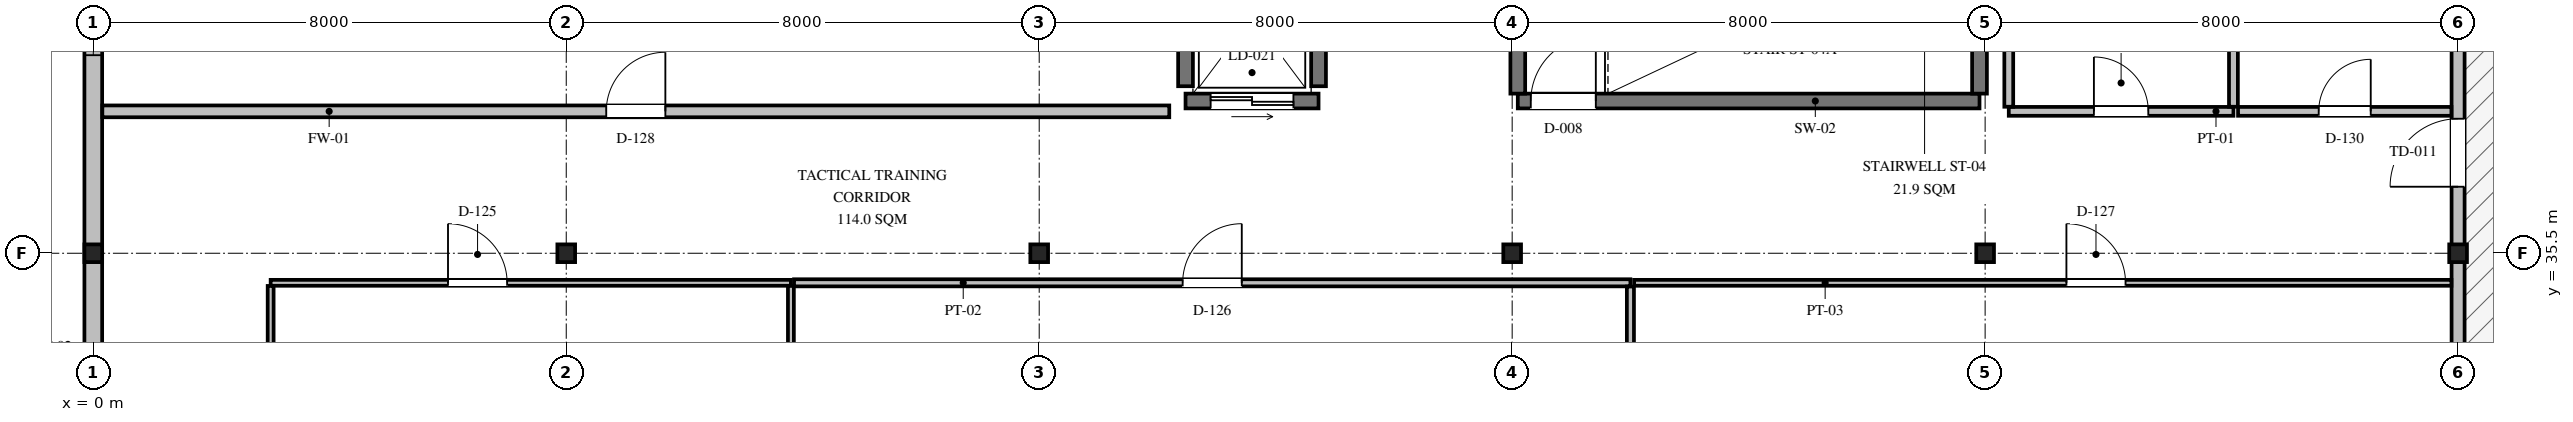
"""IFC4 building model, lengths in metres.
Left out: names, types, materials, properties, quantities, classifications, styles, units other than length and angle.
Written with IfcOpenShell. Run it as: python <this file> out.ifc"""

import sys

from ifc_helpers import new_model, si_unit, direction, frame, frame_2d, origin, origin_2d, place, context, subcontext, project, spatial, rectangle, i_section, extrude, element, fill, save


model = new_model("IFC4")
c1 = context("Model", 3, precision=1e-05, world=origin(), true_north=direction((0.0, 1.0)))
c2 = subcontext(c1, "Body", "Model", "MODEL_VIEW")
j1 = project(units=[si_unit("LENGTHUNIT", "METRE"), si_unit("PLANEANGLEUNIT", "RADIAN")], contexts=[c1])
p1 = place(None, origin())
s1 = spatial("IfcSite", under=j1, at=p1, CompositionType="ELEMENT")
p2 = place(p1, origin())
s2 = spatial("IfcBuilding", under=s1, at=p2, CompositionType="ELEMENT")
p3 = place(p2, frame((0.0, 0.0, 5.85)))
s3 = spatial("IfcBuildingStorey", under=s2, at=p3, CompositionType="ELEMENT", Elevation=5.85)
for number, where, z_axis, x_axis in (
    (1, (0.0, 35.5, 0.0), (0.0, 0.0, 1.0), (1.0, 0.0, 0.0)),
    (2, (8.0, 35.5, 0.0), (0.0, 0.0, 1.0), (1.0, 0.0, 0.0)),
    (3, (16.0, 35.5, 0.0), (0.0, 0.0, 1.0), (1.0, 0.0, 0.0)),
    (4, (24.0, 35.5, 0.0), (0.0, 0.0, 1.0), (1.0, 0.0, 0.0)),
    (5, (32.0, 35.5, 0.0), (0.0, 0.0, 1.0), (1.0, 0.0, 0.0)),
    (6, (40.0, 35.5, 0.0), (0.0, 0.0, 1.0), (1.0, 0.0, 0.0)),
):
    element("IfcColumn", number, at=place(p3, frame(where, z_axis=z_axis, x_axis=x_axis)), inside=s3, PredefinedType="COLUMN", context=c2, shape_type="SweptSolid", body=[
        extrude(i_section(OverallWidth=0.3, OverallDepth=0.3, WebThickness=0.01, FlangeThickness=0.015, FilletRadius=0.018, at=origin_2d()), origin(), (0.0, 0.0, 1.0), 4.2),
    ])
p4 = place(p3, frame((0.0, 22.65, 0.0), z_axis=(0.0, 0.0, 1.0), x_axis=(0.0, 1.0, 0.0)))
e7 = element("IfcWall", 7, at=p4, inside=s3, PredefinedType="SOLIDWALL", context=c2, shape_type="SweptSolid", body=[
    extrude(rectangle(XDim=19.675, YDim=0.3, at=frame_2d((9.837, 0.0))), origin(), (0.0, 0.0, 1.0), 3.444),
])
p5 = place(p4, frame((8.5, 0.0, 1.1)))
e8 = element("IfcOpeningElement", 8, at=p5, cuts=e7, PredefinedType="OPENING", context=c2, shape_type="SweptSolid", body=[
    extrude(rectangle(XDim=2.2, YDim=1.5, at=frame_2d((1.1, 0.75))), frame((0.0, 0.16, 0.0), z_axis=(0.0, -1.0, 0.0), x_axis=(1.0, 0.0, 0.0)), (0.0, 0.0, 1.0), 0.32),
])
p6 = place(p4, frame((16.2, 0.0, 1.1)))
e9 = element("IfcOpeningElement", 9, at=p6, cuts=e7, PredefinedType="OPENING", context=c2, shape_type="SweptSolid", body=[
    extrude(rectangle(XDim=2.4, YDim=1.5, at=frame_2d((1.2, 0.75))), frame((0.0, 0.16, 0.0), z_axis=(0.0, -1.0, 0.0), x_axis=(1.0, 0.0, 0.0)), (0.0, 0.0, 1.0), 0.32),
])
p7 = place(p3, frame((40.0, 22.625, 0.0), z_axis=(0.0, 0.0, 1.0), x_axis=(0.0, 1.0, 0.0)))
e10 = element("IfcWall", 10, at=p7, inside=s3, PredefinedType="SOLIDWALL", context=c2, shape_type="SweptSolid", body=[
    extrude(rectangle(XDim=19.7, YDim=0.22, at=frame_2d((9.85, 0.0))), origin(), (0.0, 0.0, 1.0), 3.294),
])
p8 = place(p7, frame((14.0, 0.0, 0.0)))
e11 = element("IfcOpeningElement", 11, at=p8, cuts=e10, PredefinedType="OPENING", context=c2, shape_type="SweptSolid", body=[
    extrude(rectangle(XDim=1.15, YDim=2.2, at=frame_2d((0.575, 1.1))), frame((0.0, 0.12, 0.0), z_axis=(0.0, -1.0, 0.0), x_axis=(1.0, 0.0, 0.0)), (0.0, 0.0, 1.0), 0.24),
])
p9 = place(p7, frame((3.0, 0.0, 1.0)))
e12 = element("IfcOpeningElement", 12, at=p9, cuts=e10, PredefinedType="OPENING", context=c2, shape_type="SweptSolid", body=[
    extrude(rectangle(XDim=1.75, YDim=1.3, at=frame_2d((0.875, 0.65))), frame((0.0, 0.12, 0.0), z_axis=(0.0, -1.0, 0.0), x_axis=(1.0, 0.0, 0.0)), (0.0, 0.0, 1.0), 0.24),
])
p10 = place(p3, frame((24.095, 38.075, 0.0), z_axis=(0.0, 0.0, 1.0), x_axis=(1.0, 0.0, 0.0)))
e13 = element("IfcWall", 13, at=p10, inside=s3, PredefinedType="SHEAR", context=c2, shape_type="SweptSolid", body=[
    extrude(rectangle(XDim=7.81, YDim=0.25, at=frame_2d((3.905, 0.0))), origin(), (0.0, 0.0, 1.0), 4.0),
])
p11 = place(p10, frame((0.22, 0.0, 0.0)))
e14 = element("IfcOpeningElement", 14, at=p11, cuts=e13, PredefinedType="OPENING", context=c2, shape_type="SweptSolid", body=[
    extrude(rectangle(XDim=1.1, YDim=2.15, at=frame_2d((0.55, 1.075))), frame((0.0, 0.135, 0.0), z_axis=(0.0, -1.0, 0.0), x_axis=(1.0, 0.0, 0.0)), (0.0, 0.0, 1.0), 0.27),
])
for number, where, z_axis, x_axis in (
    (15, (24.095, 38.2, 0.0), (0.0, 0.0, 1.0), (0.0, 1.0, 0.0)),
    (16, (31.905, 38.2, 0.0), (0.0, 0.0, 1.0), (0.0, 1.0, 0.0)),
):
    element("IfcWall", number, at=place(p3, frame(where, z_axis=z_axis, x_axis=x_axis)), inside=s3, PredefinedType="SHEAR", context=c2, shape_type="SweptSolid", body=[
        extrude(rectangle(XDim=2.9, YDim=0.25, at=frame_2d((1.45, 0.0))), origin(), (0.0, 0.0, 1.0), 4.0),
    ])
p12 = place(p3, frame((18.475, 38.075, 0.0), z_axis=(0.0, 0.0, 1.0), x_axis=(1.0, 0.0, 0.0)))
e17 = element("IfcWall", 17, at=p12, inside=s3, PredefinedType="SHEAR", context=c2, shape_type="SweptSolid", body=[
    extrude(rectangle(XDim=2.25, YDim=0.25, at=frame_2d((1.125, 0.0))), origin(), (0.0, 0.0, 1.0), 4.0),
])
p13 = place(p12, frame((0.425, 0.0, 0.0)))
e18 = element("IfcOpeningElement", 18, at=p13, cuts=e17, PredefinedType="OPENING", context=c2, shape_type="SweptSolid", body=[
    extrude(rectangle(XDim=1.4, YDim=2.2, at=frame_2d((0.7, 1.1))), frame((0.0, 0.135, 0.0), z_axis=(0.0, -1.0, 0.0), x_axis=(1.0, 0.0, 0.0)), (0.0, 0.0, 1.0), 0.27),
])
for number, where, z_axis, x_axis in (
    (19, (18.475, 38.325, 0.0), (0.0, 0.0, 1.0), (0.0, 1.0, 0.0)),
    (20, (20.725, 38.325, 0.0), (0.0, 0.0, 1.0), (0.0, 1.0, 0.0)),
):
    element("IfcWall", number, at=place(p3, frame(where, z_axis=z_axis, x_axis=x_axis)), inside=s3, PredefinedType="SHEAR", context=c2, shape_type="SweptSolid", body=[
        extrude(rectangle(XDim=2.35, YDim=0.25, at=frame_2d((1.175, 0.0))), origin(), (0.0, 0.0, 1.0), 4.0),
    ])
p14 = place(p3, frame((3.0, 35.0, 0.0), z_axis=(0.0, 0.0, 1.0), x_axis=(1.0, 0.0, 0.0)))
e21 = element("IfcWall", 21, at=p14, inside=s3, PredefinedType="PARTITIONING", context=c2, shape_type="SweptSolid", body=[
    extrude(rectangle(XDim=8.8, YDim=0.1, at=frame_2d((4.4, 0.0))), origin(), (0.0, 0.0, 1.0), 4.0),
])
p15 = place(p14, frame((3.0, 0.0, 0.0)))
e22 = element("IfcOpeningElement", 22, at=p15, cuts=e21, PredefinedType="OPENING", context=c2, shape_type="SweptSolid", body=[
    extrude(rectangle(XDim=1.0, YDim=2.1, at=frame_2d((0.5, 1.05))), frame((0.0, 0.06, 0.0), z_axis=(0.0, -1.0, 0.0), x_axis=(1.0, 0.0, 0.0)), (0.0, 0.0, 1.0), 0.12),
])
p16 = place(p3, frame((3.0, 27.253, 0.0), z_axis=(0.0, 0.0, 1.0), x_axis=(0.0, 1.0, 0.0)))
e23 = element("IfcWall", 23, at=p16, inside=s3, PredefinedType="PARTITIONING", context=c2, shape_type="SweptSolid", body=[
    extrude(rectangle(XDim=7.694, YDim=0.1, at=frame_2d((3.847, 0.0))), origin(), (0.0, 0.0, 1.0), 4.0),
])
p17 = place(p3, frame((11.8, 27.253, 0.0), z_axis=(0.0, 0.0, 1.0), x_axis=(0.0, 1.0, 0.0)))
e24 = element("IfcWall", 24, at=p17, inside=s3, PredefinedType="PARTITIONING", context=c2, shape_type="SweptSolid", body=[
    extrude(rectangle(XDim=7.694, YDim=0.1, at=frame_2d((3.847, 0.0))), origin(), (0.0, 0.0, 1.0), 3.694),
])
p18 = place(p3, frame((11.853, 35.0, 0.0), z_axis=(0.0, 0.0, 1.0), x_axis=(1.0, 0.0, 0.0)))
e25 = element("IfcWall", 25, at=p18, inside=s3, PredefinedType="PARTITIONING", context=c2, shape_type="SweptSolid", body=[
    extrude(rectangle(XDim=14.147, YDim=0.12, at=frame_2d((7.073, 0.0))), origin(), (0.0, 0.0, 1.0), 4.0),
])
p19 = place(p18, frame((6.573, 0.0, 0.0)))
e26 = element("IfcOpeningElement", 26, at=p19, cuts=e25, PredefinedType="OPENING", context=c2, shape_type="SweptSolid", body=[
    extrude(rectangle(XDim=1.0, YDim=2.1, at=frame_2d((0.5, 1.05))), frame((0.0, 0.07, 0.0), z_axis=(0.0, -1.0, 0.0), x_axis=(1.0, 0.0, 0.0)), (0.0, 0.0, 1.0), 0.14),
])
p20 = place(p3, frame((26.0, 22.603, 0.0), z_axis=(0.0, 0.0, 1.0), x_axis=(0.0, 1.0, 0.0)))
e27 = element("IfcWall", 27, at=p20, inside=s3, PredefinedType="PARTITIONING", context=c2, shape_type="SweptSolid", body=[
    extrude(rectangle(XDim=12.334, YDim=0.12, at=frame_2d((6.167, 0.0))), origin(), (0.0, 0.0, 1.0), 4.0),
])
p21 = place(p3, frame((26.063, 35.0, 0.0), z_axis=(0.0, 0.0, 1.0), x_axis=(1.0, 0.0, 0.0)))
e28 = element("IfcWall", 28, at=p21, inside=s3, PredefinedType="PARTITIONING", context=c2, shape_type="SweptSolid", body=[
    extrude(rectangle(XDim=13.824, YDim=0.1, at=frame_2d((6.912, 0.0))), origin(), (0.0, 0.0, 1.0), 4.0),
])
p22 = place(p21, frame((7.312, 0.0, 0.0)))
e29 = element("IfcOpeningElement", 29, at=p22, cuts=e28, PredefinedType="OPENING", context=c2, shape_type="SweptSolid", body=[
    extrude(rectangle(XDim=1.0, YDim=2.1, at=frame_2d((0.5, 1.05))), frame((0.0, 0.06, 0.0), z_axis=(0.0, -1.0, 0.0), x_axis=(1.0, 0.0, 0.0)), (0.0, 0.0, 1.0), 0.12),
])
p23 = place(p3, frame((0.153, 37.9, 0.0), z_axis=(0.0, 0.0, 1.0), x_axis=(1.0, 0.0, 0.0)))
e30 = element("IfcWall", 30, at=p23, inside=s3, PredefinedType="PARTITIONING", context=c2, shape_type="SweptSolid", body=[
    extrude(rectangle(XDim=18.047, YDim=0.2, at=frame_2d((9.023, 0.0))), origin(), (0.0, 0.0, 1.0), 4.0),
])
p24 = place(p23, frame((8.523, 0.0, 0.0)))
e31 = element("IfcOpeningElement", 31, at=p24, cuts=e30, PredefinedType="OPENING", context=c2, shape_type="SweptSolid", body=[
    extrude(rectangle(XDim=1.0, YDim=2.1, at=frame_2d((0.5, 1.05))), frame((0.0, 0.11, 0.0), z_axis=(0.0, -1.0, 0.0), x_axis=(1.0, 0.0, 0.0)), (0.0, 0.0, 1.0), 0.22),
])
p25 = place(p3, frame((32.4, 37.9, 0.0), z_axis=(0.0, 0.0, 1.0), x_axis=(1.0, 0.0, 0.0)))
e32 = element("IfcWall", 32, at=p25, inside=s3, PredefinedType="PARTITIONING", context=c2, shape_type="SweptSolid", body=[
    extrude(rectangle(XDim=3.8, YDim=0.15, at=frame_2d((1.9, 0.0))), origin(), (0.0, 0.0, 1.0), 4.0),
])
p26 = place(p25, frame((1.44, 0.0, 0.0)))
e33 = element("IfcOpeningElement", 33, at=p26, cuts=e32, PredefinedType="OPENING", context=c2, shape_type="SweptSolid", body=[
    extrude(rectangle(XDim=0.92, YDim=2.1, at=frame_2d((0.46, 1.05))), frame((0.0, 0.085, 0.0), z_axis=(0.0, -1.0, 0.0), x_axis=(1.0, 0.0, 0.0)), (0.0, 0.0, 1.0), 0.17),
])
p27 = place(p3, frame((32.4, 37.978, 0.0), z_axis=(0.0, 0.0, 1.0), x_axis=(0.0, 1.0, 0.0)))
e34 = element("IfcWall", 34, at=p27, inside=s3, PredefinedType="PARTITIONING", context=c2, shape_type="SweptSolid", body=[
    extrude(rectangle(XDim=4.044, YDim=0.15, at=frame_2d((2.022, 0.0))), origin(), (0.0, 0.0, 1.0), 4.0),
])
p28 = place(p3, frame((36.2, 37.978, 0.0), z_axis=(0.0, 0.0, 1.0), x_axis=(0.0, 1.0, 0.0)))
e35 = element("IfcWall", 35, at=p28, inside=s3, PredefinedType="PARTITIONING", context=c2, shape_type="SweptSolid", body=[
    extrude(rectangle(XDim=4.044, YDim=0.15, at=frame_2d((2.022, 0.0))), origin(), (0.0, 0.0, 1.0), 3.7),
])
p29 = place(p3, frame((36.278, 37.9, 0.0), z_axis=(0.0, 0.0, 1.0), x_axis=(1.0, 0.0, 0.0)))
e36 = element("IfcWall", 36, at=p29, inside=s3, PredefinedType="PARTITIONING", context=c2, shape_type="SweptSolid", body=[
    extrude(rectangle(XDim=3.609, YDim=0.15, at=frame_2d((1.804, 0.0))), origin(), (0.0, 0.0, 1.0), 4.0),
])
p30 = place(p29, frame((1.365, 0.0, 0.0)))
e37 = element("IfcOpeningElement", 37, at=p30, cuts=e36, PredefinedType="OPENING", context=c2, shape_type="SweptSolid", body=[
    extrude(rectangle(XDim=0.88, YDim=2.1, at=frame_2d((0.44, 1.05))), frame((0.0, 0.085, 0.0), z_axis=(0.0, -1.0, 0.0), x_axis=(1.0, 0.0, 0.0)), (0.0, 0.0, 1.0), 0.17),
])
p31 = place(p6, origin())
e38 = element("IfcWindow", 38, at=p31, inside=s3, PartitioningType="SINGLE_PANEL", PredefinedType="WINDOW", context=c2, shape_type="SweptSolid", body=[
    extrude(rectangle(XDim=2.4, YDim=1.5, at=frame_2d((1.2, 0.75))), frame((0.0, 0.03, 0.0), z_axis=(0.0, -1.0, 0.0), x_axis=(1.0, 0.0, 0.0)), (0.0, 0.0, 1.0), 0.06),
])
fill(e9, e38)
p32 = place(p8, frame((1.15, 0.0, 0.0), z_axis=(0.0, 0.0, 1.0), x_axis=(-1.0, 0.0, 0.0)))
e39 = element("IfcDoor", 39, at=p32, inside=s3, OperationType="SINGLE_SWING_LEFT", PredefinedType="DOOR", context=c2, shape_type="SweptSolid", body=[
    extrude(rectangle(XDim=1.15, YDim=2.2, at=frame_2d((0.575, 1.1))), frame((0.0, 0.025, 0.0), z_axis=(0.0, -1.0, 0.0), x_axis=(1.0, 0.0, 0.0)), (0.0, 0.0, 1.0), 0.05),
])
fill(e11, e39)
p33 = place(p11, frame((1.1, 0.0, 0.0), z_axis=(0.0, 0.0, 1.0), x_axis=(-1.0, 0.0, 0.0)))
e40 = element("IfcDoor", 40, at=p33, inside=s3, OperationType="SINGLE_SWING_RIGHT", PredefinedType="DOOR", context=c2, shape_type="SweptSolid", body=[
    extrude(rectangle(XDim=1.1, YDim=2.15, at=frame_2d((0.55, 1.075))), frame((0.0, 0.025, 0.0), z_axis=(0.0, -1.0, 0.0), x_axis=(1.0, 0.0, 0.0)), (0.0, 0.0, 1.0), 0.05),
])
fill(e14, e40)
p34 = place(p13, origin())
e41 = element("IfcDoor", 41, at=p34, inside=s3, OperationType="DOUBLE_DOOR_SLIDING", PredefinedType="DOOR", context=c2, shape_type="SweptSolid", body=[
    extrude(rectangle(XDim=1.4, YDim=2.2, at=frame_2d((0.7, 1.1))), frame((0.0, 0.025, 0.0), z_axis=(0.0, -1.0, 0.0), x_axis=(1.0, 0.0, 0.0)), (0.0, 0.0, 1.0), 0.05),
])
fill(e18, e41)
p35 = place(p15, origin())
e42 = element("IfcDoor", 42, at=p35, inside=s3, OperationType="SINGLE_SWING_LEFT", PredefinedType="DOOR", context=c2, shape_type="SweptSolid", body=[
    extrude(rectangle(XDim=1.0, YDim=2.1, at=frame_2d((0.5, 1.05))), frame((0.0, 0.025, 0.0), z_axis=(0.0, -1.0, 0.0), x_axis=(1.0, 0.0, 0.0)), (0.0, 0.0, 1.0), 0.05),
])
fill(e22, e42)
p36 = place(p19, origin())
e43 = element("IfcDoor", 43, at=p36, inside=s3, OperationType="SINGLE_SWING_RIGHT", PredefinedType="DOOR", context=c2, shape_type="SweptSolid", body=[
    extrude(rectangle(XDim=1.0, YDim=2.1, at=frame_2d((0.5, 1.05))), frame((0.0, 0.025, 0.0), z_axis=(0.0, -1.0, 0.0), x_axis=(1.0, 0.0, 0.0)), (0.0, 0.0, 1.0), 0.05),
])
fill(e26, e43)
p37 = place(p22, origin())
e44 = element("IfcDoor", 44, at=p37, inside=s3, OperationType="SINGLE_SWING_LEFT", PredefinedType="DOOR", context=c2, shape_type="SweptSolid", body=[
    extrude(rectangle(XDim=1.0, YDim=2.1, at=frame_2d((0.5, 1.05))), frame((0.0, 0.025, 0.0), z_axis=(0.0, -1.0, 0.0), x_axis=(1.0, 0.0, 0.0)), (0.0, 0.0, 1.0), 0.05),
])
fill(e29, e44)
p38 = place(p24, origin())
e45 = element("IfcDoor", 45, at=p38, inside=s3, OperationType="SINGLE_SWING_RIGHT", PredefinedType="DOOR", context=c2, shape_type="SweptSolid", body=[
    extrude(rectangle(XDim=1.0, YDim=2.1, at=frame_2d((0.5, 1.05))), frame((0.0, 0.025, 0.0), z_axis=(0.0, -1.0, 0.0), x_axis=(1.0, 0.0, 0.0)), (0.0, 0.0, 1.0), 0.05),
])
fill(e31, e45)
p39 = place(p26, origin())
e46 = element("IfcDoor", 46, at=p39, inside=s3, OperationType="SINGLE_SWING_LEFT", PredefinedType="DOOR", context=c2, shape_type="SweptSolid", body=[
    extrude(rectangle(XDim=0.92, YDim=2.1, at=frame_2d((0.46, 1.05))), frame((0.0, 0.025, 0.0), z_axis=(0.0, -1.0, 0.0), x_axis=(1.0, 0.0, 0.0)), (0.0, 0.0, 1.0), 0.05),
])
fill(e33, e46)
p40 = place(p30, origin())
e47 = element("IfcDoor", 47, at=p40, inside=s3, OperationType="SINGLE_SWING_RIGHT", PredefinedType="DOOR", context=c2, shape_type="SweptSolid", body=[
    extrude(rectangle(XDim=0.88, YDim=2.1, at=frame_2d((0.44, 1.05))), frame((0.0, 0.025, 0.0), z_axis=(0.0, -1.0, 0.0), x_axis=(1.0, 0.0, 0.0)), (0.0, 0.0, 1.0), 0.05),
])
fill(e37, e47)
save(model, sys.argv[1])
